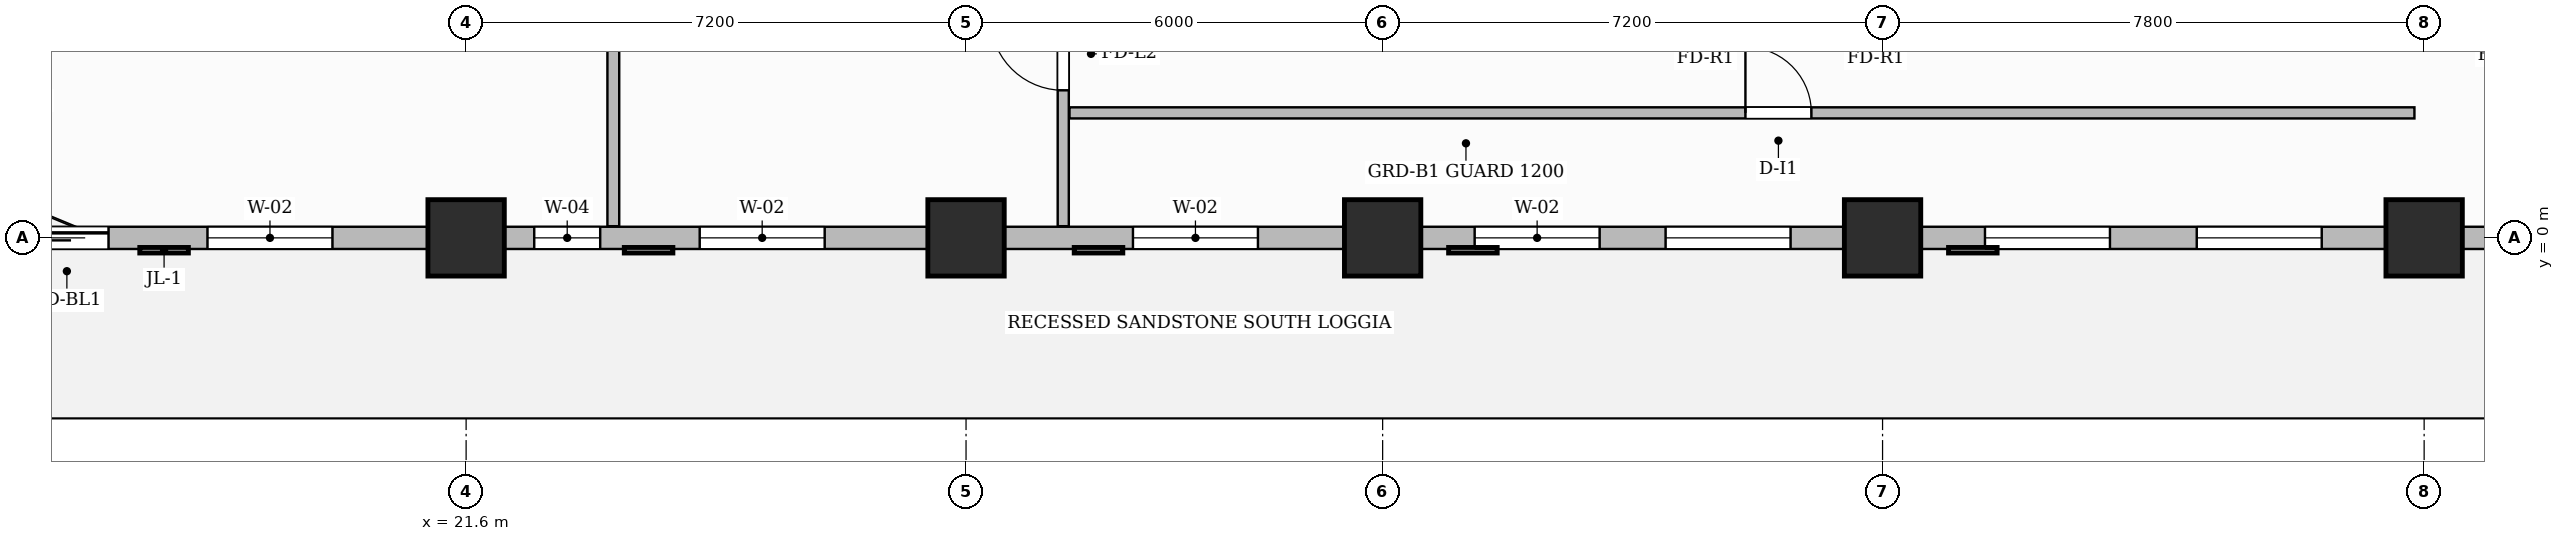
"""IFC4 building model, lengths in metres.
Left out: names, types, materials, properties, quantities, classifications, styles, units other than length and angle.
Written with IfcOpenShell. Run it as: python <this file> out.ifc"""

import sys

from ifc_helpers import new_model, si_unit, direction, frame, frame_2d, origin, origin_2d, place, context, subcontext, project, spatial, rectangle, extrude, source, transform, mapped, element, fill, save


model = new_model("IFC4")
c1 = context("Model", 3, precision=1e-05, world=origin(), true_north=direction((0.0, 1.0)))
c2 = subcontext(c1, "Body", "Model", "MODEL_VIEW")
j1 = project(units=[si_unit("LENGTHUNIT", "METRE"), si_unit("PLANEANGLEUNIT", "RADIAN")], contexts=[c1])
p1 = place(None, origin())
s1 = spatial("IfcSite", under=j1, at=p1, CompositionType="ELEMENT")
p2 = place(p1, origin())
s2 = spatial("IfcBuilding", under=s1, at=p2, CompositionType="ELEMENT")
p3 = place(p2, frame((0.0, 0.0, 91.6)))
s3 = spatial("IfcBuildingStorey", under=s2, at=p3, CompositionType="ELEMENT", Elevation=91.6)
m1 = source(origin(), c2, "Body", "SweptSolid", [
    extrude(rectangle(XDim=1.1, YDim=1.1, at=origin_2d()), origin(), (0.0, 0.0, 1.0), 3.7),
])
for number, where, z_axis, x_axis in (
    (1, (21.6, 0.0, 0.0), (0.0, 0.0, 1.0), (1.0, 0.0, 0.0)),
    (2, (28.8, 0.0, 0.0), (0.0, 0.0, 1.0), (1.0, 0.0, 0.0)),
    (3, (34.8, 0.0, 0.0), (0.0, 0.0, 1.0), (1.0, 0.0, 0.0)),
    (4, (42.0, 0.0, 0.0), (0.0, 0.0, 1.0), (1.0, 0.0, 0.0)),
    (5, (49.8, 0.0, 0.0), (0.0, 0.0, 1.0), (1.0, 0.0, 0.0)),
):
    element("IfcColumn", number, at=place(p3, frame(where, z_axis=z_axis, x_axis=x_axis)), inside=s3, PredefinedType="COLUMN", context=c2, shape_type="MappedRepresentation", body=[
        mapped(m1, transform((0.0, 0.0, 0.0), scale=1.0)),
    ])
p4 = place(p3, frame((30.2, 0.168, 0.0), z_axis=(0.0, 0.0, 1.0), x_axis=(0.0, 1.0, 0.0)))
e6 = element("IfcWall", 6, at=p4, inside=s3, PredefinedType="PARTITIONING", context=c2, shape_type="SweptSolid", body=[
    extrude(rectangle(XDim=9.692, YDim=0.16, at=frame_2d((4.846, 0.0))), origin(), (0.0, 0.0, 1.0), 3.45),
])
p5 = place(p4, frame((1.957, 0.0, 0.0)))
e7 = element("IfcOpeningElement", 7, at=p5, cuts=e6, PredefinedType="OPENING", context=c2, shape_type="SweptSolid", body=[
    extrude(rectangle(XDim=1.05, YDim=2.15, at=frame_2d((0.525, 1.075))), frame((0.0, 0.09, 0.0), z_axis=(0.0, -1.0, 0.0), x_axis=(1.0, 0.0, 0.0)), (0.0, 0.0, 1.0), 0.18),
])
p6 = place(p3, frame((30.29, 1.8, 0.0), z_axis=(0.0, 0.0, 1.0), x_axis=(1.0, 0.0, 0.0)))
e8 = element("IfcWall", 8, at=p6, inside=s3, PredefinedType="PARTITIONING", context=c2, shape_type="SweptSolid", body=[
    extrude(rectangle(XDim=19.37, YDim=0.16, at=frame_2d((9.685, 0.0))), origin(), (0.0, 0.0, 1.0), 3.45),
])
p7 = place(p6, frame((9.735, 0.0, 0.0)))
e9 = element("IfcOpeningElement", 9, at=p7, cuts=e8, PredefinedType="OPENING", context=c2, shape_type="SweptSolid", body=[
    extrude(rectangle(XDim=0.95, YDim=2.15, at=frame_2d((0.475, 1.075))), frame((0.0, 0.09, 0.0), z_axis=(0.0, -1.0, 0.0), x_axis=(1.0, 0.0, 0.0)), (0.0, 0.0, 1.0), 0.18),
])
p8 = place(p3, frame((23.72, 0.168, 0.0), z_axis=(0.0, 0.0, 1.0), x_axis=(0.0, 1.0, 0.0)))
e10 = element("IfcWall", 10, at=p8, inside=s3, PredefinedType="PARTITIONING", context=c2, shape_type="SweptSolid", body=[
    extrude(rectangle(XDim=9.692, YDim=0.17, at=frame_2d((4.846, 0.0))), origin(), (0.0, 0.0, 1.0), 3.45),
])
p9 = place(p3, frame((14.4, 0.0, 0.0), z_axis=(0.0, 0.0, 1.0), x_axis=(1.0, 0.0, 0.0)))
e11 = element("IfcWall", 11, at=p9, inside=s3, PredefinedType="SOLIDWALL", context=c2, shape_type="SweptSolid", body=[
    extrude(rectangle(XDim=43.2, YDim=0.32, at=frame_2d((21.6, 0.0))), origin(), (0.0, 0.0, 1.0), 2.885),
])
p10 = place(p9, frame((0.85, 0.0, 0.0)))
e12 = element("IfcOpeningElement", 12, at=p10, cuts=e11, PredefinedType="OPENING", context=c2, shape_type="SweptSolid", body=[
    extrude(rectangle(XDim=1.2, YDim=2.2, at=frame_2d((0.6, 1.1))), frame((0.0, 0.17, 0.0), z_axis=(0.0, -1.0, 0.0), x_axis=(1.0, 0.0, 0.0)), (0.0, 0.0, 1.0), 0.34),
])
p11 = place(p9, frame((3.475, 0.0, 0.8)))
e13 = element("IfcOpeningElement", 13, at=p11, cuts=e11, PredefinedType="OPENING", context=c2, shape_type="SweptSolid", body=[
    extrude(rectangle(XDim=1.8, YDim=1.85, at=frame_2d((0.9, 0.925))), frame((0.0, 0.17, 0.0), z_axis=(0.0, -1.0, 0.0), x_axis=(1.0, 0.0, 0.0)), (0.0, 0.0, 1.0), 0.34),
])
p12 = place(p9, frame((8.181, 0.0, 0.8)))
e14 = element("IfcOpeningElement", 14, at=p12, cuts=e11, PredefinedType="OPENING", context=c2, shape_type="SweptSolid", body=[
    extrude(rectangle(XDim=0.95, YDim=1.75, at=frame_2d((0.475, 0.875))), frame((0.0, 0.17, 0.0), z_axis=(0.0, -1.0, 0.0), x_axis=(1.0, 0.0, 0.0)), (0.0, 0.0, 1.0), 0.34),
])
p13 = place(p9, frame((10.564, 0.0, 0.8)))
e15 = element("IfcOpeningElement", 15, at=p13, cuts=e11, PredefinedType="OPENING", context=c2, shape_type="SweptSolid", body=[
    extrude(rectangle(XDim=1.8, YDim=1.85, at=frame_2d((0.9, 0.925))), frame((0.0, 0.17, 0.0), z_axis=(0.0, -1.0, 0.0), x_axis=(1.0, 0.0, 0.0)), (0.0, 0.0, 1.0), 0.34),
])
p14 = place(p9, frame((16.804, 0.0, 0.8)))
e16 = element("IfcOpeningElement", 16, at=p14, cuts=e11, PredefinedType="OPENING", context=c2, shape_type="SweptSolid", body=[
    extrude(rectangle(XDim=1.8, YDim=1.85, at=frame_2d((0.9, 0.925))), frame((0.0, 0.17, 0.0), z_axis=(0.0, -1.0, 0.0), x_axis=(1.0, 0.0, 0.0)), (0.0, 0.0, 1.0), 0.34),
])
p15 = place(p9, frame((21.725, 0.0, 0.8)))
e17 = element("IfcOpeningElement", 17, at=p15, cuts=e11, PredefinedType="OPENING", context=c2, shape_type="SweptSolid", body=[
    extrude(rectangle(XDim=1.8, YDim=1.85, at=frame_2d((0.9, 0.925))), frame((0.0, 0.17, 0.0), z_axis=(0.0, -1.0, 0.0), x_axis=(1.0, 0.0, 0.0)), (0.0, 0.0, 1.0), 0.34),
])
p16 = place(p9, frame((24.475, 0.0, 0.8)))
e18 = element("IfcOpeningElement", 18, at=p16, cuts=e11, PredefinedType="OPENING", context=c2, shape_type="SweptSolid", body=[
    extrude(rectangle(XDim=1.8, YDim=1.85, at=frame_2d((0.9, 0.925))), frame((0.0, 0.17, 0.0), z_axis=(0.0, -1.0, 0.0), x_axis=(1.0, 0.0, 0.0)), (0.0, 0.0, 1.0), 0.34),
])
p17 = place(p9, frame((29.075, 0.0, 0.8)))
e19 = element("IfcOpeningElement", 19, at=p17, cuts=e11, PredefinedType="OPENING", context=c2, shape_type="SweptSolid", body=[
    extrude(rectangle(XDim=1.8, YDim=1.85, at=frame_2d((0.9, 0.925))), frame((0.0, 0.17, 0.0), z_axis=(0.0, -1.0, 0.0), x_axis=(1.0, 0.0, 0.0)), (0.0, 0.0, 1.0), 0.34),
])
p18 = place(p9, frame((32.125, 0.0, 0.8)))
e20 = element("IfcOpeningElement", 20, at=p18, cuts=e11, PredefinedType="OPENING", context=c2, shape_type="SweptSolid", body=[
    extrude(rectangle(XDim=1.8, YDim=1.85, at=frame_2d((0.9, 0.925))), frame((0.0, 0.17, 0.0), z_axis=(0.0, -1.0, 0.0), x_axis=(1.0, 0.0, 0.0)), (0.0, 0.0, 1.0), 0.34),
])
p19 = place(p9, frame((36.875, 0.0, 0.8)))
e21 = element("IfcOpeningElement", 21, at=p19, cuts=e11, PredefinedType="OPENING", context=c2, shape_type="SweptSolid", body=[
    extrude(rectangle(XDim=1.8, YDim=1.85, at=frame_2d((0.9, 0.925))), frame((0.0, 0.17, 0.0), z_axis=(0.0, -1.0, 0.0), x_axis=(1.0, 0.0, 0.0)), (0.0, 0.0, 1.0), 0.34),
])
p20 = place(p9, frame((39.925, 0.0, 0.8)))
e22 = element("IfcOpeningElement", 22, at=p20, cuts=e11, PredefinedType="OPENING", context=c2, shape_type="SweptSolid", body=[
    extrude(rectangle(XDim=1.8, YDim=1.85, at=frame_2d((0.9, 0.925))), frame((0.0, 0.17, 0.0), z_axis=(0.0, -1.0, 0.0), x_axis=(1.0, 0.0, 0.0)), (0.0, 0.0, 1.0), 0.34),
])
m2 = source(origin(), c2, "Body", "SweptSolid", [
    extrude(rectangle(XDim=1.05, YDim=2.15, at=frame_2d((0.525, 1.075))), frame((0.0, 0.025, 0.0), z_axis=(0.0, -1.0, 0.0), x_axis=(1.0, 0.0, 0.0)), (0.0, 0.0, 1.0), 0.05),
])
p21 = place(p5, origin())
e23 = element("IfcDoor", 23, at=p21, inside=s3, OperationType="SINGLE_SWING_RIGHT", PredefinedType="DOOR", context=c2, shape_type="MappedRepresentation", body=[
    mapped(m2, transform((0.0, 0.0, 0.0), scale=1.0)),
])
fill(e7, e23)
m3 = source(origin(), c2, "Body", "SweptSolid", [
    extrude(rectangle(XDim=0.95, YDim=2.15, at=frame_2d((0.475, 1.075))), frame((0.0, 0.025, 0.0), z_axis=(0.0, -1.0, 0.0), x_axis=(1.0, 0.0, 0.0)), (0.0, 0.0, 1.0), 0.05),
])
p22 = place(p7, origin())
e24 = element("IfcDoor", 24, at=p22, inside=s3, OperationType="SINGLE_SWING_LEFT", PredefinedType="DOOR", context=c2, shape_type="MappedRepresentation", body=[
    mapped(m3, transform((0.0, 0.0, 0.0), scale=1.0)),
])
fill(e9, e24)
m4 = source(origin(), c2, "Body", "SweptSolid", [
    extrude(rectangle(XDim=1.2, YDim=2.2, at=frame_2d((0.6, 1.1))), frame((0.0, 0.025, 0.0), z_axis=(0.0, -1.0, 0.0), x_axis=(1.0, 0.0, 0.0)), (0.0, 0.0, 1.0), 0.05),
])
p23 = place(p10, origin())
e25 = element("IfcDoor", 25, at=p23, inside=s3, OperationType="SLIDING_TO_LEFT", PredefinedType="DOOR", context=c2, shape_type="MappedRepresentation", body=[
    mapped(m4, transform((0.0, 0.0, 0.0), scale=1.0)),
])
fill(e12, e25)
m5 = source(origin(), c2, "Body", "SweptSolid", [
    extrude(rectangle(XDim=1.8, YDim=1.85, at=frame_2d((0.9, 0.925))), frame((0.0, 0.03, 0.0), z_axis=(0.0, -1.0, 0.0), x_axis=(1.0, 0.0, 0.0)), (0.0, 0.0, 1.0), 0.06),
])
p24 = place(p11, origin())
e26 = element("IfcWindow", 26, at=p24, inside=s3, PartitioningType="DOUBLE_PANEL_VERTICAL", PredefinedType="WINDOW", context=c2, shape_type="MappedRepresentation", body=[
    mapped(m5, transform((0.0, 0.0, 0.0), scale=1.0)),
])
fill(e13, e26)
m6 = source(origin(), c2, "Body", "SweptSolid", [
    extrude(rectangle(XDim=0.95, YDim=1.75, at=frame_2d((0.475, 0.875))), frame((0.0, 0.03, 0.0), z_axis=(0.0, -1.0, 0.0), x_axis=(1.0, 0.0, 0.0)), (0.0, 0.0, 1.0), 0.06),
])
p25 = place(p12, origin())
e27 = element("IfcWindow", 27, at=p25, inside=s3, PartitioningType="SINGLE_PANEL", PredefinedType="WINDOW", context=c2, shape_type="MappedRepresentation", body=[
    mapped(m6, transform((0.0, 0.0, 0.0), scale=1.0)),
])
fill(e14, e27)
p26 = place(p13, origin())
e28 = element("IfcWindow", 28, at=p26, inside=s3, PartitioningType="DOUBLE_PANEL_VERTICAL", PredefinedType="WINDOW", context=c2, shape_type="MappedRepresentation", body=[
    mapped(m5, transform((0.0, 0.0, 0.0), scale=1.0)),
])
fill(e15, e28)
p27 = place(p14, origin())
e29 = element("IfcWindow", 29, at=p27, inside=s3, PartitioningType="DOUBLE_PANEL_VERTICAL", PredefinedType="WINDOW", context=c2, shape_type="MappedRepresentation", body=[
    mapped(m5, transform((0.0, 0.0, 0.0), scale=1.0)),
])
fill(e16, e29)
p28 = place(p15, origin())
e30 = element("IfcWindow", 30, at=p28, inside=s3, PartitioningType="DOUBLE_PANEL_VERTICAL", PredefinedType="WINDOW", context=c2, shape_type="MappedRepresentation", body=[
    mapped(m5, transform((0.0, 0.0, 0.0), scale=1.0)),
])
fill(e17, e30)
p29 = place(p16, origin())
e31 = element("IfcWindow", 31, at=p29, inside=s3, PartitioningType="DOUBLE_PANEL_VERTICAL", PredefinedType="WINDOW", context=c2, shape_type="MappedRepresentation", body=[
    mapped(m5, transform((0.0, 0.0, 0.0), scale=1.0)),
])
fill(e18, e31)
p30 = place(p17, origin())
e32 = element("IfcWindow", 32, at=p30, inside=s3, PartitioningType="DOUBLE_PANEL_VERTICAL", PredefinedType="WINDOW", context=c2, shape_type="MappedRepresentation", body=[
    mapped(m5, transform((0.0, 0.0, 0.0), scale=1.0)),
])
fill(e19, e32)
p31 = place(p18, origin())
e33 = element("IfcWindow", 33, at=p31, inside=s3, PartitioningType="DOUBLE_PANEL_VERTICAL", PredefinedType="WINDOW", context=c2, shape_type="MappedRepresentation", body=[
    mapped(m5, transform((0.0, 0.0, 0.0), scale=1.0)),
])
fill(e20, e33)
save(model, sys.argv[1])
